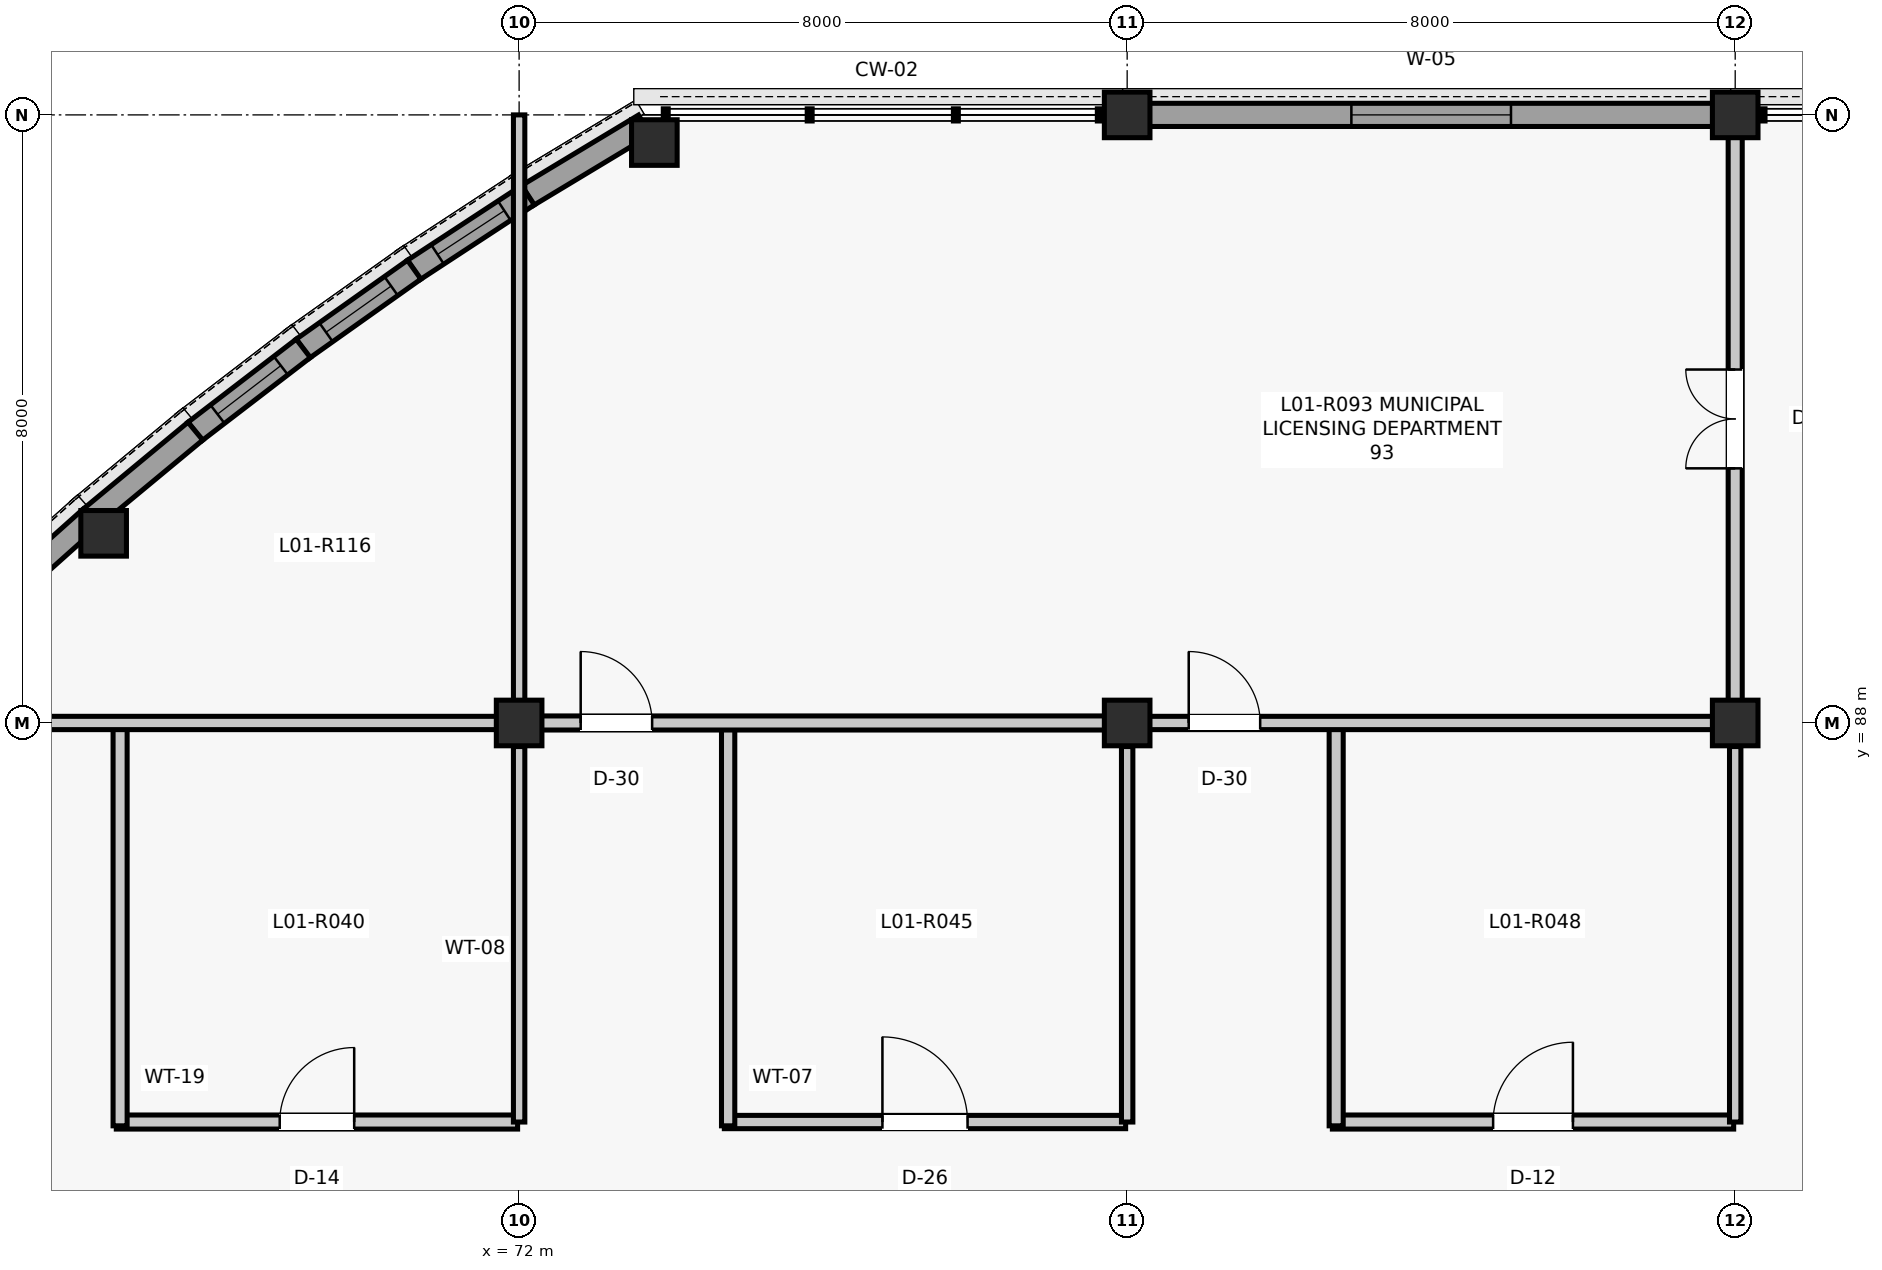
"""IFC4 building model, lengths in metres.
Left out: names, types, materials, properties, quantities, classifications, styles, units other than length and angle.
Written with IfcOpenShell. Run it as: python <this file> out.ifc"""

import sys

from ifc_helpers import new_model, si_unit, direction, frame, frame_2d, origin, origin_2d, place, context, subcontext, project, spatial, rectangle, extrude, element, fill, save


model = new_model("IFC4")
c1 = context("Model", 3, precision=1e-05, world=origin(), true_north=direction((0.0, 1.0)))
c2 = subcontext(c1, "Body", "Model", "MODEL_VIEW")
j1 = project(units=[si_unit("LENGTHUNIT", "METRE"), si_unit("PLANEANGLEUNIT", "RADIAN")], contexts=[c1])
p1 = place(None, origin())
s1 = spatial("IfcSite", under=j1, at=p1, CompositionType="ELEMENT")
p2 = place(p1, origin())
s2 = spatial("IfcBuilding", under=s1, at=p2, CompositionType="ELEMENT")
p3 = place(p2, frame((0.0, 0.0, 5.28)))
s3 = spatial("IfcBuildingStorey", under=s2, at=p3, CompositionType="ELEMENT", Elevation=5.28)
for number, where, z_axis, x_axis in (
    (1, (72.0, 88.0, 0.0), (0.0, 0.0, 1.0), (1.0, 0.0, 0.0)),
    (2, (80.0, 88.0, 0.0), (0.0, 0.0, 1.0), (1.0, 0.0, 0.0)),
    (3, (80.0, 96.0, 0.0), (0.0, 0.0, 1.0), (1.0, 0.0, 0.0)),
    (4, (88.0, 88.0, 0.0), (0.0, 0.0, 1.0), (1.0, 0.0, 0.0)),
    (5, (88.0, 96.0, 0.0), (0.0, 0.0, 1.0), (1.0, 0.0, 0.0)),
    (6, (73.779, 95.636, 0.0), (0.0, 0.0, 1.0), (1.0, 0.0, 0.0)),
    (7, (66.533, 90.495, 0.0), (0.0, 0.0, 1.0), (1.0, 0.0, 0.0)),
):
    element("IfcColumn", number, at=place(p3, frame(where, z_axis=z_axis, x_axis=x_axis)), inside=s3, PredefinedType="COLUMN", context=c2, shape_type="SweptSolid", body=[
        extrude(rectangle(XDim=0.6, YDim=0.6, at=origin_2d()), origin(), (0.0, 0.0, 1.0), 4.62),
    ])
p4 = place(p3, frame((73.649, 95.867, 0.0), z_axis=(0.0, 0.0, 1.0), x_axis=(-0.856543302071, -0.51607516088, 0.0)))
e8 = element("IfcWall", 8, at=p4, inside=s3, PredefinedType="SOLIDWALL", context=c2, shape_type="SweptSolid", body=[
    extrude(rectangle(XDim=1.795, YDim=0.305, at=frame_2d((0.897, 0.0))), origin(), (0.0, 0.0, 1.0), 4.335),
])
p5 = place(p3, frame((72.117, 94.944, 0.0), z_axis=(0.0, 0.0, 1.0), x_axis=(-0.836686786408, -0.547681678944, 0.0)))
e9 = element("IfcWall", 9, at=p5, inside=s3, PredefinedType="SOLIDWALL", context=c2, shape_type="SweptSolid", body=[
    extrude(rectangle(XDim=1.795, YDim=0.305, at=frame_2d((0.897, 0.0))), origin(), (0.0, 0.0, 1.0), 4.335),
])
p6 = place(p5, frame((0.373, 0.0, 0.9)))
e10 = element("IfcOpeningElement", 10, at=p6, cuts=e9, PredefinedType="OPENING", context=c2, shape_type="SweptSolid", body=[
    extrude(rectangle(XDim=1.05, YDim=1.85, at=frame_2d((0.525, 0.925))), frame((0.0, 0.162, 0.0), z_axis=(0.0, -1.0, 0.0), x_axis=(1.0, 0.0, 0.0)), (0.0, 0.0, 1.0), 0.325),
])
p7 = place(p3, frame((70.62, 93.964, 0.0), z_axis=(0.0, 0.0, 1.0), x_axis=(-0.815567185578, -0.578662393636, 0.0)))
e11 = element("IfcWall", 11, at=p7, inside=s3, PredefinedType="SOLIDWALL", context=c2, shape_type="SweptSolid", body=[
    extrude(rectangle(XDim=1.795, YDim=0.305, at=frame_2d((0.897, 0.0))), origin(), (0.0, 0.0, 1.0), 4.335),
])
p8 = place(p7, frame((0.373, 0.0, 0.9)))
e12 = element("IfcOpeningElement", 12, at=p8, cuts=e11, PredefinedType="OPENING", context=c2, shape_type="SweptSolid", body=[
    extrude(rectangle(XDim=1.05, YDim=1.85, at=frame_2d((0.525, 0.925))), frame((0.0, 0.162, 0.0), z_axis=(0.0, -1.0, 0.0), x_axis=(1.0, 0.0, 0.0)), (0.0, 0.0, 1.0), 0.325),
])
p9 = place(p3, frame((69.16, 92.928, 0.0), z_axis=(0.0, 0.0, 1.0), x_axis=(-0.793341406114, -0.608776981616, 0.0)))
e13 = element("IfcWall", 13, at=p9, inside=s3, PredefinedType="SOLIDWALL", context=c2, shape_type="SweptSolid", body=[
    extrude(rectangle(XDim=1.795, YDim=0.305, at=frame_2d((0.897, 0.0))), origin(), (0.0, 0.0, 1.0), 4.335),
])
p10 = place(p9, frame((0.373, 0.0, 0.9)))
e14 = element("IfcOpeningElement", 14, at=p10, cuts=e13, PredefinedType="OPENING", context=c2, shape_type="SweptSolid", body=[
    extrude(rectangle(XDim=1.05, YDim=1.85, at=frame_2d((0.525, 0.925))), frame((0.0, 0.162, 0.0), z_axis=(0.0, -1.0, 0.0), x_axis=(1.0, 0.0, 0.0)), (0.0, 0.0, 1.0), 0.325),
])
p11 = place(p3, frame((67.74, 91.839, 0.0), z_axis=(0.0, 0.0, 1.0), x_axis=(-0.769991012207, -0.638054732073, 0.0)))
e15 = element("IfcWall", 15, at=p11, inside=s3, PredefinedType="SOLIDWALL", context=c2, shape_type="SweptSolid", body=[
    extrude(rectangle(XDim=1.795, YDim=0.305, at=frame_2d((0.897, 0.0))), origin(), (0.0, 0.0, 1.0), 4.335),
])
p12 = place(p3, frame((66.363, 90.698, 0.0), z_axis=(0.0, 0.0, 1.0), x_axis=(-0.745703543965, -0.666277888361, 0.0)))
e16 = element("IfcWall", 16, at=p12, inside=s3, PredefinedType="SOLIDWALL", context=c2, shape_type="SweptSolid", body=[
    extrude(rectangle(XDim=1.795, YDim=0.305, at=frame_2d((0.897, 0.0))), origin(), (0.0, 0.0, 1.0), 4.335),
])
p13 = place(p3, frame((80.285, 96.0, 0.0), z_axis=(0.0, 0.0, 1.0), x_axis=(1.0, 0.0, 0.0)))
e17 = element("IfcWall", 17, at=p13, inside=s3, PredefinedType="SOLIDWALL", context=c2, shape_type="SweptSolid", body=[
    extrude(rectangle(XDim=7.43, YDim=0.305, at=frame_2d((3.715, 0.0))), origin(), (0.0, 0.0, 1.0), 4.022),
])
p14 = place(p13, frame((2.665, 0.0, 0.9)))
e18 = element("IfcOpeningElement", 18, at=p14, cuts=e17, PredefinedType="OPENING", context=c2, shape_type="SweptSolid", body=[
    extrude(rectangle(XDim=2.1, YDim=2.4, at=frame_2d((1.05, 1.2))), frame((0.0, 0.162, 0.0), z_axis=(0.0, -1.0, 0.0), x_axis=(1.0, 0.0, 0.0)), (0.0, 0.0, 1.0), 0.325),
])
p15 = place(p3, frame((66.7, 82.75, 0.0), z_axis=(0.0, 0.0, 1.0), x_axis=(1.0, 0.0, 0.0)))
e19 = element("IfcWall", 19, at=p15, inside=s3, PredefinedType="PARTITIONING", context=c2, shape_type="SweptSolid", body=[
    extrude(rectangle(XDim=5.28, YDim=0.185, at=frame_2d((2.64, 0.0))), origin(), (0.0, 0.0, 1.0), 3.896),
])
p16 = place(p15, frame((2.15, 0.0, 0.0)))
e20 = element("IfcOpeningElement", 20, at=p16, cuts=e19, PredefinedType="OPENING", context=c2, shape_type="SweptSolid", body=[
    extrude(rectangle(XDim=0.98, YDim=2.15, at=frame_2d((0.49, 1.075))), frame((0.0, 0.103, 0.0), z_axis=(0.0, -1.0, 0.0), x_axis=(1.0, 0.0, 0.0)), (0.0, 0.0, 1.0), 0.205),
])
p17 = place(p3, frame((66.75, 82.7, 0.0), z_axis=(0.0, 0.0, 1.0), x_axis=(0.0, 1.0, 0.0)))
e21 = element("IfcWall", 21, at=p17, inside=s3, PredefinedType="PARTITIONING", context=c2, shape_type="SweptSolid", body=[
    extrude(rectangle(XDim=5.28, YDim=0.185, at=frame_2d((2.64, 0.0))), origin(), (0.0, 0.0, 1.0), 4.325),
])
p18 = place(p3, frame((72.0, 82.75, 0.0), z_axis=(0.0, 0.0, 1.0), x_axis=(0.0, 1.0, 0.0)))
e22 = element("IfcWall", 22, at=p18, inside=s3, PredefinedType="PARTITIONING", context=c2, shape_type="SweptSolid", body=[
    extrude(rectangle(XDim=4.94, YDim=0.15, at=frame_2d((2.47, 0.0))), origin(), (0.0, 0.0, 1.0), 3.896),
])
p19 = place(p3, frame((74.7, 82.75, 0.0), z_axis=(0.0, 0.0, 1.0), x_axis=(1.0, 0.0, 0.0)))
e23 = element("IfcWall", 23, at=p19, inside=s3, PredefinedType="PARTITIONING", context=c2, shape_type="SweptSolid", body=[
    extrude(rectangle(XDim=5.28, YDim=0.175, at=frame_2d((2.64, 0.0))), origin(), (0.0, 0.0, 1.0), 3.832),
])
p20 = place(p19, frame((2.08, 0.0, 0.0)))
e24 = element("IfcOpeningElement", 24, at=p20, cuts=e23, PredefinedType="OPENING", context=c2, shape_type="SweptSolid", body=[
    extrude(rectangle(XDim=1.12, YDim=2.22, at=frame_2d((0.56, 1.11))), frame((0.0, 0.097, 0.0), z_axis=(0.0, -1.0, 0.0), x_axis=(1.0, 0.0, 0.0)), (0.0, 0.0, 1.0), 0.195),
])
p21 = place(p3, frame((74.75, 82.7, 0.0), z_axis=(0.0, 0.0, 1.0), x_axis=(0.0, 1.0, 0.0)))
e25 = element("IfcWall", 25, at=p21, inside=s3, PredefinedType="PARTITIONING", context=c2, shape_type="SweptSolid", body=[
    extrude(rectangle(XDim=5.28, YDim=0.175, at=frame_2d((2.64, 0.0))), origin(), (0.0, 0.0, 1.0), 3.757),
])
p22 = place(p3, frame((80.0, 82.75, 0.0), z_axis=(0.0, 0.0, 1.0), x_axis=(0.0, 1.0, 0.0)))
e26 = element("IfcWall", 26, at=p22, inside=s3, PredefinedType="PARTITIONING", context=c2, shape_type="SweptSolid", body=[
    extrude(rectangle(XDim=4.94, YDim=0.15, at=frame_2d((2.47, 0.0))), origin(), (0.0, 0.0, 1.0), 3.832),
])
p23 = place(p3, frame((82.7, 82.75, 0.0), z_axis=(0.0, 0.0, 1.0), x_axis=(1.0, 0.0, 0.0)))
e27 = element("IfcWall", 27, at=p23, inside=s3, PredefinedType="PARTITIONING", context=c2, shape_type="SweptSolid", body=[
    extrude(rectangle(XDim=5.28, YDim=0.185, at=frame_2d((2.64, 0.0))), origin(), (0.0, 0.0, 1.0), 3.902),
])
p24 = place(p23, frame((2.115, 0.0, 0.0)))
e28 = element("IfcOpeningElement", 28, at=p24, cuts=e27, PredefinedType="OPENING", context=c2, shape_type="SweptSolid", body=[
    extrude(rectangle(XDim=1.05, YDim=2.15, at=frame_2d((0.525, 1.075))), frame((0.0, 0.103, 0.0), z_axis=(0.0, -1.0, 0.0), x_axis=(1.0, 0.0, 0.0)), (0.0, 0.0, 1.0), 0.205),
])
p25 = place(p3, frame((82.75, 82.7, 0.0), z_axis=(0.0, 0.0, 1.0), x_axis=(0.0, 1.0, 0.0)))
e29 = element("IfcWall", 29, at=p25, inside=s3, PredefinedType="PARTITIONING", context=c2, shape_type="SweptSolid", body=[
    extrude(rectangle(XDim=5.28, YDim=0.185, at=frame_2d((2.64, 0.0))), origin(), (0.0, 0.0, 1.0), 3.832),
])
p26 = place(p3, frame((88.0, 82.75, 0.0), z_axis=(0.0, 0.0, 1.0), x_axis=(0.0, 1.0, 0.0)))
e30 = element("IfcWall", 30, at=p26, inside=s3, PredefinedType="PARTITIONING", context=c2, shape_type="SweptSolid", body=[
    extrude(rectangle(XDim=4.94, YDim=0.15, at=frame_2d((2.47, 0.0))), origin(), (0.0, 0.0, 1.0), 3.902),
])
p27 = place(p3, frame((64.0, 88.0, 0.0), z_axis=(0.0, 0.0, 1.0), x_axis=(1.0, 0.0, 0.0)))
e31 = element("IfcWall", 31, at=p27, inside=s3, PredefinedType="PARTITIONING", context=c2, shape_type="SweptSolid", body=[
    extrude(rectangle(XDim=7.71, YDim=0.175, at=frame_2d((3.855, 0.0))), origin(), (0.0, 0.0, 1.0), 4.325),
])
p28 = place(p27, frame((0.52, 0.0, 0.0)))
e32 = element("IfcOpeningElement", 32, at=p28, cuts=e31, PredefinedType="OPENING", context=c2, shape_type="SweptSolid", body=[
    extrude(rectangle(XDim=0.94, YDim=2.12, at=frame_2d((0.47, 1.06))), frame((0.0, 0.097, 0.0), z_axis=(0.0, -1.0, 0.0), x_axis=(1.0, 0.0, 0.0)), (0.0, 0.0, 1.0), 0.195),
])
p29 = place(p3, frame((72.0, 88.29, 0.0), z_axis=(0.0, 0.0, 1.0), x_axis=(0.0, 1.0, 0.0)))
e33 = element("IfcWall", 33, at=p29, inside=s3, PredefinedType="PARTITIONING", context=c2, shape_type="SweptSolid", body=[
    extrude(rectangle(XDim=7.71, YDim=0.15, at=frame_2d((3.855, 0.0))), origin(), (0.0, 0.0, 1.0), 4.325),
])
p30 = place(p3, frame((72.29, 88.0, 0.0), z_axis=(0.0, 0.0, 1.0), x_axis=(1.0, 0.0, 0.0)))
e34 = element("IfcWall", 34, at=p30, inside=s3, PredefinedType="PARTITIONING", context=c2, shape_type="SweptSolid", body=[
    extrude(rectangle(XDim=7.42, YDim=0.185, at=frame_2d((3.71, 0.0))), origin(), (0.0, 0.0, 1.0), 3.757),
])
p31 = place(p30, frame((0.52, 0.0, 0.0)))
e35 = element("IfcOpeningElement", 35, at=p31, cuts=e34, PredefinedType="OPENING", context=c2, shape_type="SweptSolid", body=[
    extrude(rectangle(XDim=0.94, YDim=2.12, at=frame_2d((0.47, 1.06))), frame((0.0, 0.103, 0.0), z_axis=(0.0, -1.0, 0.0), x_axis=(1.0, 0.0, 0.0)), (0.0, 0.0, 1.0), 0.205),
])
p32 = place(p3, frame((80.29, 88.0, 0.0), z_axis=(0.0, 0.0, 1.0), x_axis=(1.0, 0.0, 0.0)))
e36 = element("IfcWall", 36, at=p32, inside=s3, PredefinedType="PARTITIONING", context=c2, shape_type="SweptSolid", body=[
    extrude(rectangle(XDim=7.42, YDim=0.175, at=frame_2d((3.71, 0.0))), origin(), (0.0, 0.0, 1.0), 3.832),
])
p33 = place(p32, frame((0.52, 0.0, 0.0)))
e37 = element("IfcOpeningElement", 37, at=p33, cuts=e36, PredefinedType="OPENING", context=c2, shape_type="SweptSolid", body=[
    extrude(rectangle(XDim=0.94, YDim=2.12, at=frame_2d((0.47, 1.06))), frame((0.0, 0.097, 0.0), z_axis=(0.0, -1.0, 0.0), x_axis=(1.0, 0.0, 0.0)), (0.0, 0.0, 1.0), 0.195),
])
p34 = place(p3, frame((88.0, 88.29, 0.0), z_axis=(0.0, 0.0, 1.0), x_axis=(0.0, 1.0, 0.0)))
e38 = element("IfcWall", 38, at=p34, inside=s3, PredefinedType="PARTITIONING", context=c2, shape_type="SweptSolid", body=[
    extrude(rectangle(XDim=7.42, YDim=0.185, at=frame_2d((3.71, 0.0))), origin(), (0.0, 0.0, 1.0), 3.826),
])
p35 = place(p34, frame((3.06, 0.0, 0.0)))
e39 = element("IfcOpeningElement", 39, at=p35, cuts=e38, PredefinedType="OPENING", context=c2, shape_type="SweptSolid", body=[
    extrude(rectangle(XDim=1.3, YDim=2.2, at=frame_2d((0.65, 1.1))), frame((0.0, 0.103, 0.0), z_axis=(0.0, -1.0, 0.0), x_axis=(1.0, 0.0, 0.0)), (0.0, 0.0, 1.0), 0.205),
])
p36 = place(p6, origin())
e40 = element("IfcWindow", 40, at=p36, inside=s3, PartitioningType="SINGLE_PANEL", PredefinedType="WINDOW", context=c2, shape_type="SweptSolid", body=[
    extrude(rectangle(XDim=1.05, YDim=1.85, at=frame_2d((0.525, 0.925))), frame((0.0, 0.03, 0.0), z_axis=(0.0, -1.0, 0.0), x_axis=(1.0, 0.0, 0.0)), (0.0, 0.0, 1.0), 0.06),
])
fill(e10, e40)
p37 = place(p8, origin())
e41 = element("IfcWindow", 41, at=p37, inside=s3, PartitioningType="SINGLE_PANEL", PredefinedType="WINDOW", context=c2, shape_type="SweptSolid", body=[
    extrude(rectangle(XDim=1.05, YDim=1.85, at=frame_2d((0.525, 0.925))), frame((0.0, 0.03, 0.0), z_axis=(0.0, -1.0, 0.0), x_axis=(1.0, 0.0, 0.0)), (0.0, 0.0, 1.0), 0.06),
])
fill(e12, e41)
p38 = place(p10, origin())
e42 = element("IfcWindow", 42, at=p38, inside=s3, PartitioningType="SINGLE_PANEL", PredefinedType="WINDOW", context=c2, shape_type="SweptSolid", body=[
    extrude(rectangle(XDim=1.05, YDim=1.85, at=frame_2d((0.525, 0.925))), frame((0.0, 0.03, 0.0), z_axis=(0.0, -1.0, 0.0), x_axis=(1.0, 0.0, 0.0)), (0.0, 0.0, 1.0), 0.06),
])
fill(e14, e42)
p39 = place(p14, origin())
e43 = element("IfcWindow", 43, at=p39, inside=s3, PartitioningType="SINGLE_PANEL", PredefinedType="WINDOW", context=c2, shape_type="SweptSolid", body=[
    extrude(rectangle(XDim=2.1, YDim=2.4, at=frame_2d((1.05, 1.2))), frame((0.0, 0.03, 0.0), z_axis=(0.0, -1.0, 0.0), x_axis=(1.0, 0.0, 0.0)), (0.0, 0.0, 1.0), 0.06),
])
fill(e18, e43)
p40 = place(p16, origin())
e44 = element("IfcDoor", 44, at=p40, inside=s3, OperationType="SINGLE_SWING_RIGHT", PredefinedType="DOOR", context=c2, shape_type="SweptSolid", body=[
    extrude(rectangle(XDim=0.98, YDim=2.15, at=frame_2d((0.49, 1.075))), frame((0.0, 0.025, 0.0), z_axis=(0.0, -1.0, 0.0), x_axis=(1.0, 0.0, 0.0)), (0.0, 0.0, 1.0), 0.05),
])
fill(e20, e44)
p41 = place(p20, origin())
e45 = element("IfcDoor", 45, at=p41, inside=s3, OperationType="SINGLE_SWING_LEFT", PredefinedType="DOOR", context=c2, shape_type="SweptSolid", body=[
    extrude(rectangle(XDim=1.12, YDim=2.22, at=frame_2d((0.56, 1.11))), frame((0.0, 0.025, 0.0), z_axis=(0.0, -1.0, 0.0), x_axis=(1.0, 0.0, 0.0)), (0.0, 0.0, 1.0), 0.05),
])
fill(e24, e45)
p42 = place(p24, origin())
e46 = element("IfcDoor", 46, at=p42, inside=s3, OperationType="SINGLE_SWING_RIGHT", PredefinedType="DOOR", context=c2, shape_type="SweptSolid", body=[
    extrude(rectangle(XDim=1.05, YDim=2.15, at=frame_2d((0.525, 1.075))), frame((0.0, 0.025, 0.0), z_axis=(0.0, -1.0, 0.0), x_axis=(1.0, 0.0, 0.0)), (0.0, 0.0, 1.0), 0.05),
])
fill(e28, e46)
p43 = place(p31, origin())
e47 = element("IfcDoor", 47, at=p43, inside=s3, OperationType="SINGLE_SWING_LEFT", PredefinedType="DOOR", context=c2, shape_type="SweptSolid", body=[
    extrude(rectangle(XDim=0.94, YDim=2.12, at=frame_2d((0.47, 1.06))), frame((0.0, 0.025, 0.0), z_axis=(0.0, -1.0, 0.0), x_axis=(1.0, 0.0, 0.0)), (0.0, 0.0, 1.0), 0.05),
])
fill(e35, e47)
p44 = place(p33, origin())
e48 = element("IfcDoor", 48, at=p44, inside=s3, OperationType="SINGLE_SWING_LEFT", PredefinedType="DOOR", context=c2, shape_type="SweptSolid", body=[
    extrude(rectangle(XDim=0.94, YDim=2.12, at=frame_2d((0.47, 1.06))), frame((0.0, 0.025, 0.0), z_axis=(0.0, -1.0, 0.0), x_axis=(1.0, 0.0, 0.0)), (0.0, 0.0, 1.0), 0.05),
])
fill(e37, e48)
p45 = place(p35, origin())
e49 = element("IfcDoor", 49, at=p45, inside=s3, OperationType="DOUBLE_DOOR_SINGLE_SWING", PredefinedType="DOOR", context=c2, shape_type="SweptSolid", body=[
    extrude(rectangle(XDim=1.3, YDim=2.2, at=frame_2d((0.65, 1.1))), frame((0.0, 0.025, 0.0), z_axis=(0.0, -1.0, 0.0), x_axis=(1.0, 0.0, 0.0)), (0.0, 0.0, 1.0), 0.05),
])
fill(e39, e49)
save(model, sys.argv[1])
